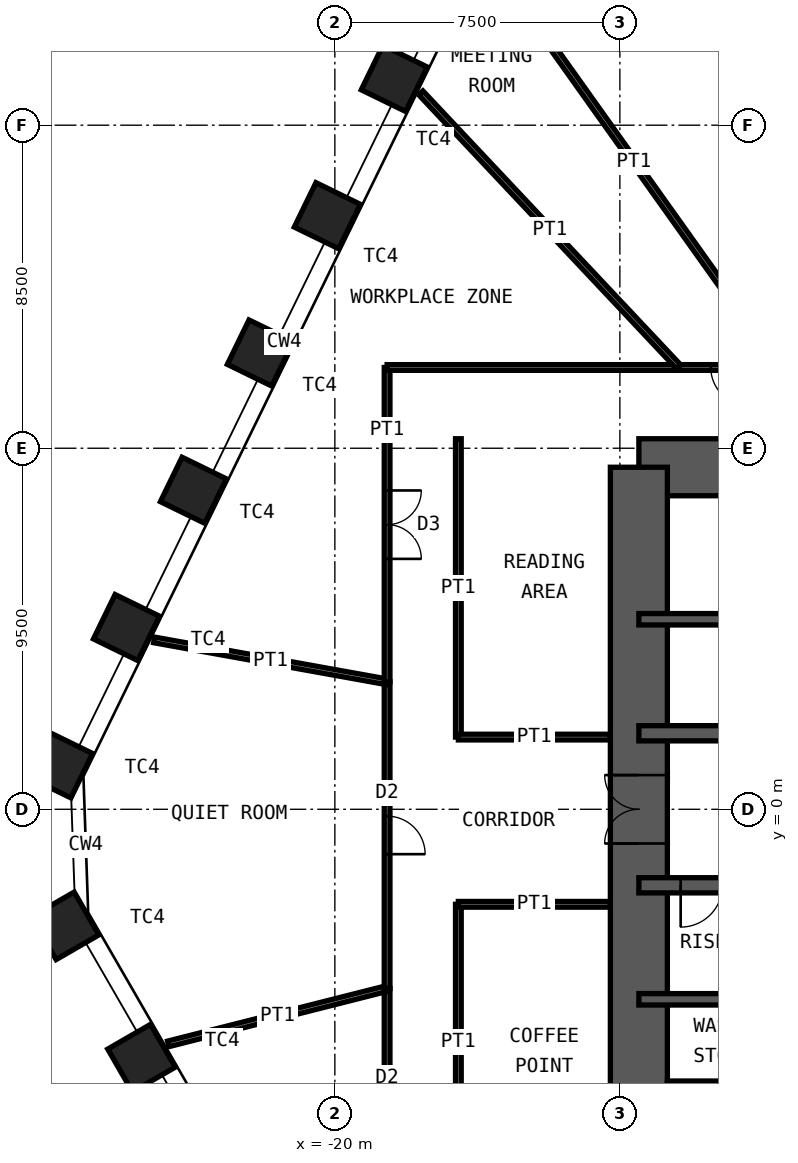
"""IFC4 building model, lengths in metres.
Left out: names, types, materials, properties, quantities, classifications, styles, units other than length and angle.
Written with IfcOpenShell. Run it as: python <this file> out.ifc"""

import sys

from ifc_helpers import new_model, si_unit, direction, frame, frame_2d, origin, origin_2d, place, context, subcontext, project, spatial, rectangle, hollow_rectangle, extrude, element, fill, save


model = new_model("IFC4")
c1 = context("Model", 3, precision=1e-05, world=origin(), true_north=direction((0.0, 1.0)))
c2 = subcontext(c1, "Body", "Model", "MODEL_VIEW")
j1 = project(units=[si_unit("LENGTHUNIT", "METRE"), si_unit("PLANEANGLEUNIT", "RADIAN")], contexts=[c1])
p1 = place(None, origin())
s1 = spatial("IfcSite", under=j1, at=p1, CompositionType="ELEMENT")
p2 = place(p1, origin())
s2 = spatial("IfcBuilding", under=s1, at=p2, CompositionType="ELEMENT")
p3 = place(p2, frame((0.0, 0.0, 149.2)))
s3 = spatial("IfcBuildingStorey", under=s2, at=p3, CompositionType="ELEMENT", Elevation=149.2)
for number, where, z_axis, x_axis in (
    (1, (-25.087, -6.547, 0.0), (0.0, 0.0, 1.0), (0.5, -0.866, 0.0)),
    (2, (-27.097, -3.067, 0.0), (0.0, 0.0, 1.0), (0.5, -0.866, 0.0)),
    (3, (-27.245, 1.169, 0.0), (0.0, 0.0, 1.0), (-0.438, -0.899, 0.0)),
    (4, (-25.483, 4.781, 0.0), (0.0, 0.0, 1.0), (-0.438, -0.899, 0.0)),
    (5, (-23.721, 8.394, 0.0), (0.0, 0.0, 1.0), (-0.438, -0.899, 0.0)),
    (6, (-21.959, 12.006, 0.0), (0.0, 0.0, 1.0), (-0.438, -0.899, 0.0)),
    (7, (-20.198, 15.618, 0.0), (0.0, 0.0, 1.0), (-0.438, -0.899, 0.0)),
    (8, (-18.436, 19.23, 0.0), (0.0, 0.0, 1.0), (-0.438, -0.899, 0.0)),
):
    element("IfcColumn", number, at=place(p3, frame(where, z_axis=z_axis, x_axis=x_axis)), inside=s3, PredefinedType="COLUMN", context=c2, shape_type="SweptSolid", body=[
        extrude(hollow_rectangle(XDim=1.3, YDim=1.3, WallThickness=0.1, at=origin_2d()), origin(), (0.0, 0.0, 1.0), 4.2),
    ])
p4 = place(p3, frame((-12.0, 9.0, 0.0), z_axis=(0.0, 0.0, 1.0), x_axis=(1.0, 0.0, 0.0)))
e9 = element("IfcWall", 9, at=p4, inside=s3, PredefinedType="SHEAR", context=c2, shape_type="SweptSolid", body=[
    extrude(rectangle(XDim=24.0, YDim=1.5, at=frame_2d((12.0, 0.0))), origin(), (0.0, 0.0, 1.0), 4.2),
])
p5 = place(p4, frame((10.4, 0.0, 0.0)))
e10 = element("IfcOpeningElement", 10, at=p5, cuts=e9, PredefinedType="OPENING", context=c2, shape_type="SweptSolid", body=[
    extrude(rectangle(XDim=1.0, YDim=2.1, at=frame_2d((0.5, 1.05))), frame((0.0, 0.76, 0.0), z_axis=(0.0, -1.0, 0.0), x_axis=(1.0, 0.0, 0.0)), (0.0, 0.0, 1.0), 1.52),
])
p6 = place(p4, frame((17.6, 0.0, 0.0)))
e11 = element("IfcOpeningElement", 11, at=p6, cuts=e9, PredefinedType="OPENING", context=c2, shape_type="SweptSolid", body=[
    extrude(rectangle(XDim=0.9, YDim=2.1, at=frame_2d((0.45, 1.05))), frame((0.0, 0.76, 0.0), z_axis=(0.0, -1.0, 0.0), x_axis=(1.0, 0.0, 0.0)), (0.0, 0.0, 1.0), 1.52),
])
p7 = place(p4, frame((21.9, 0.0, 0.0)))
e12 = element("IfcOpeningElement", 12, at=p7, cuts=e9, PredefinedType="OPENING", context=c2, shape_type="SweptSolid", body=[
    extrude(rectangle(XDim=0.9, YDim=2.1, at=frame_2d((0.45, 1.05))), frame((0.0, 0.76, 0.0), z_axis=(0.0, -1.0, 0.0), x_axis=(1.0, 0.0, 0.0)), (0.0, 0.0, 1.0), 1.52),
])
p8 = place(p3, frame((-12.0, -9.0, 0.0), z_axis=(0.0, 0.0, 1.0), x_axis=(0.0, 1.0, 0.0)))
e13 = element("IfcWall", 13, at=p8, inside=s3, PredefinedType="SHEAR", context=c2, shape_type="SweptSolid", body=[
    extrude(rectangle(XDim=18.0, YDim=1.5, at=frame_2d((9.0, 0.0))), origin(), (0.0, 0.0, 1.0), 4.2),
])
p9 = place(p8, frame((8.1, 0.0, 0.0)))
e14 = element("IfcOpeningElement", 14, at=p9, cuts=e13, PredefinedType="OPENING", context=c2, shape_type="SweptSolid", body=[
    extrude(rectangle(XDim=1.8, YDim=2.1, at=frame_2d((0.9, 1.05))), frame((0.0, 0.76, 0.0), z_axis=(0.0, -1.0, 0.0), x_axis=(1.0, 0.0, 0.0)), (0.0, 0.0, 1.0), 1.52),
])
p10 = place(p3, frame((-12.0, 5.0, 0.0), z_axis=(0.0, 0.0, 1.0), x_axis=(1.0, 0.0, 0.0)))
e15 = element("IfcWall", 15, at=p10, inside=s3, PredefinedType="SHEAR", context=c2, shape_type="SweptSolid", body=[
    extrude(rectangle(XDim=24.0, YDim=0.3, at=frame_2d((12.0, 0.0))), origin(), (0.0, 0.0, 1.0), 4.2),
])
p11 = place(p3, frame((-12.0, 2.0, 0.0), z_axis=(0.0, 0.0, 1.0), x_axis=(1.0, 0.0, 0.0)))
e16 = element("IfcWall", 16, at=p11, inside=s3, PredefinedType="SHEAR", context=c2, shape_type="SweptSolid", body=[
    extrude(rectangle(XDim=24.0, YDim=0.4, at=frame_2d((12.0, 0.0))), origin(), (0.0, 0.0, 1.0), 4.2),
])
p12 = place(p11, frame((2.4, 0.0, 0.0)))
e17 = element("IfcOpeningElement", 17, at=p12, cuts=e16, PredefinedType="OPENING", context=c2, shape_type="SweptSolid", body=[
    extrude(rectangle(XDim=1.1, YDim=2.1, at=frame_2d((0.55, 1.05))), frame((0.0, 0.21, 0.0), z_axis=(0.0, -1.0, 0.0), x_axis=(1.0, 0.0, 0.0)), (0.0, 0.0, 1.0), 0.42),
])
p13 = place(p11, frame((22.0, 0.0, 0.0)))
e18 = element("IfcOpeningElement", 18, at=p13, cuts=e16, PredefinedType="OPENING", context=c2, shape_type="SweptSolid", body=[
    extrude(rectangle(XDim=1.1, YDim=2.1, at=frame_2d((0.55, 1.05))), frame((0.0, 0.21, 0.0), z_axis=(0.0, -1.0, 0.0), x_axis=(1.0, 0.0, 0.0)), (0.0, 0.0, 1.0), 0.42),
])
p14 = place(p11, frame((10.15, 0.0, 0.0)))
e19 = element("IfcOpeningElement", 19, at=p14, cuts=e16, PredefinedType="OPENING", context=c2, shape_type="SweptSolid", body=[
    extrude(rectangle(XDim=1.0, YDim=2.1, at=frame_2d((0.5, 1.05))), frame((0.0, 0.21, 0.0), z_axis=(0.0, -1.0, 0.0), x_axis=(1.0, 0.0, 0.0)), (0.0, 0.0, 1.0), 0.42),
])
p15 = place(p11, frame((6.9, 0.0, 0.0)))
e20 = element("IfcOpeningElement", 20, at=p15, cuts=e16, PredefinedType="OPENING", context=c2, shape_type="SweptSolid", body=[
    extrude(rectangle(XDim=1.0, YDim=2.1, at=frame_2d((0.5, 1.05))), frame((0.0, 0.21, 0.0), z_axis=(0.0, -1.0, 0.0), x_axis=(1.0, 0.0, 0.0)), (0.0, 0.0, 1.0), 0.42),
])
p16 = place(p11, frame((13.35, 0.0, 0.0)))
e21 = element("IfcOpeningElement", 21, at=p16, cuts=e16, PredefinedType="OPENING", context=c2, shape_type="SweptSolid", body=[
    extrude(rectangle(XDim=1.1, YDim=2.4, at=frame_2d((0.55, 1.2))), frame((0.0, 0.21, 0.0), z_axis=(0.0, -1.0, 0.0), x_axis=(1.0, 0.0, 0.0)), (0.0, 0.0, 1.0), 0.42),
])
p17 = place(p11, frame((16.15, 0.0, 0.0)))
e22 = element("IfcOpeningElement", 22, at=p17, cuts=e16, PredefinedType="OPENING", context=c2, shape_type="SweptSolid", body=[
    extrude(rectangle(XDim=1.1, YDim=2.4, at=frame_2d((0.55, 1.2))), frame((0.0, 0.21, 0.0), z_axis=(0.0, -1.0, 0.0), x_axis=(1.0, 0.0, 0.0)), (0.0, 0.0, 1.0), 0.42),
])
p18 = place(p11, frame((18.95, 0.0, 0.0)))
e23 = element("IfcOpeningElement", 23, at=p18, cuts=e16, PredefinedType="OPENING", context=c2, shape_type="SweptSolid", body=[
    extrude(rectangle(XDim=1.1, YDim=2.4, at=frame_2d((0.55, 1.2))), frame((0.0, 0.21, 0.0), z_axis=(0.0, -1.0, 0.0), x_axis=(1.0, 0.0, 0.0)), (0.0, 0.0, 1.0), 0.42),
])
p19 = place(p3, frame((-12.0, -2.0, 0.0), z_axis=(0.0, 0.0, 1.0), x_axis=(1.0, 0.0, 0.0)))
e24 = element("IfcWall", 24, at=p19, inside=s3, PredefinedType="SHEAR", context=c2, shape_type="SweptSolid", body=[
    extrude(rectangle(XDim=24.0, YDim=0.4, at=frame_2d((12.0, 0.0))), origin(), (0.0, 0.0, 1.0), 4.2),
])
p20 = place(p19, frame((1.1, 0.0, 0.0)))
e25 = element("IfcOpeningElement", 25, at=p20, cuts=e24, PredefinedType="OPENING", context=c2, shape_type="SweptSolid", body=[
    extrude(rectangle(XDim=1.1, YDim=2.1, at=frame_2d((0.55, 1.05))), frame((0.0, 0.21, 0.0), z_axis=(0.0, -1.0, 0.0), x_axis=(1.0, 0.0, 0.0)), (0.0, 0.0, 1.0), 0.42),
])
p21 = place(p19, frame((13.55, 0.0, 0.0)))
e26 = element("IfcOpeningElement", 26, at=p21, cuts=e24, PredefinedType="OPENING", context=c2, shape_type="SweptSolid", body=[
    extrude(rectangle(XDim=1.1, YDim=2.1, at=frame_2d((0.55, 1.05))), frame((0.0, 0.21, 0.0), z_axis=(0.0, -1.0, 0.0), x_axis=(1.0, 0.0, 0.0)), (0.0, 0.0, 1.0), 0.42),
])
p22 = place(p19, frame((20.7, 0.0, 0.0)))
e27 = element("IfcOpeningElement", 27, at=p22, cuts=e24, PredefinedType="OPENING", context=c2, shape_type="SweptSolid", body=[
    extrude(rectangle(XDim=1.1, YDim=2.1, at=frame_2d((0.55, 1.05))), frame((0.0, 0.21, 0.0), z_axis=(0.0, -1.0, 0.0), x_axis=(1.0, 0.0, 0.0)), (0.0, 0.0, 1.0), 0.42),
])
p23 = place(p19, frame((4.0, 0.0, 0.0)))
e28 = element("IfcOpeningElement", 28, at=p23, cuts=e24, PredefinedType="OPENING", context=c2, shape_type="SweptSolid", body=[
    extrude(rectangle(XDim=1.0, YDim=2.1, at=frame_2d((0.5, 1.05))), frame((0.0, 0.21, 0.0), z_axis=(0.0, -1.0, 0.0), x_axis=(1.0, 0.0, 0.0)), (0.0, 0.0, 1.0), 0.42),
])
p24 = place(p3, frame((-12.0, -5.0, 0.0), z_axis=(0.0, 0.0, 1.0), x_axis=(1.0, 0.0, 0.0)))
e29 = element("IfcWall", 29, at=p24, inside=s3, PredefinedType="SHEAR", context=c2, shape_type="SweptSolid", body=[
    extrude(rectangle(XDim=24.0, YDim=0.3, at=frame_2d((12.0, 0.0))), origin(), (0.0, 0.0, 1.0), 4.2),
])
p25 = place(p3, frame((-11.25, -7.2, 0.0), z_axis=(0.0, 0.0, 1.0), x_axis=(1.0, 0.0, 0.0)))
e30 = element("IfcWall", 30, at=p25, inside=s3, PredefinedType="PARTITIONING", context=c2, shape_type="SweptSolid", body=[
    extrude(rectangle(XDim=2.9, YDim=0.1, at=frame_2d((1.45, 0.0))), origin(), (0.0, 0.0, 1.0), 3.98),
])
p26 = place(p25, frame((0.1, 0.0, 0.0)))
e31 = element("IfcOpeningElement", 31, at=p26, cuts=e30, PredefinedType="OPENING", context=c2, shape_type="SweptSolid", body=[
    extrude(rectangle(XDim=1.0, YDim=2.4, at=frame_2d((0.5, 1.2))), frame((0.0, 0.06, 0.0), z_axis=(0.0, -1.0, 0.0), x_axis=(1.0, 0.0, 0.0)), (0.0, 0.0, 1.0), 0.12),
])
p27 = place(p3, frame((-18.625, -11.625, 0.0), z_axis=(0.0, 0.0, 1.0), x_axis=(0.0, 1.0, 0.0)))
e32 = element("IfcWall", 32, at=p27, inside=s3, PredefinedType="PARTITIONING", context=c2, shape_type="SweptSolid", body=[
    extrude(rectangle(XDim=6.91, YDim=0.15, at=frame_2d((3.455, 0.0))), origin(), (0.0, 0.0, 1.0), 4.03),
])
p28 = place(p27, frame((2.955, 0.0, 0.0)))
e33 = element("IfcOpeningElement", 33, at=p28, cuts=e32, PredefinedType="OPENING", context=c2, shape_type="SweptSolid", body=[
    extrude(rectangle(XDim=1.0, YDim=2.4, at=frame_2d((0.5, 1.2))), frame((0.0, 0.085, 0.0), z_axis=(0.0, -1.0, 0.0), x_axis=(1.0, 0.0, 0.0)), (0.0, 0.0, 1.0), 0.17),
])
p29 = place(p3, frame((-24.384, -6.173, 0.0), z_axis=(0.0, 0.0, 1.0), x_axis=(0.969427635767, 0.245377380804, 0.0)))
e34 = element("IfcWall", 34, at=p29, inside=s3, PredefinedType="PARTITIONING", context=c2, shape_type="SweptSolid", body=[
    extrude(rectangle(XDim=5.941, YDim=0.15, at=frame_2d((2.97, 0.0))), origin(), (0.0, 0.0, 1.0), 3.33),
])
p30 = place(p3, frame((-18.625, -4.715, 0.0), z_axis=(0.0, 0.0, 1.0), x_axis=(0.0, 1.0, 0.0)))
e35 = element("IfcWall", 35, at=p30, inside=s3, PredefinedType="PARTITIONING", context=c2, shape_type="SweptSolid", body=[
    extrude(rectangle(XDim=8.068, YDim=0.15, at=frame_2d((4.034, 0.0))), origin(), (0.0, 0.0, 1.0), 4.03),
])
p31 = place(p30, frame((3.534, 0.0, 0.0)))
e36 = element("IfcOpeningElement", 36, at=p31, cuts=e35, PredefinedType="OPENING", context=c2, shape_type="SweptSolid", body=[
    extrude(rectangle(XDim=1.0, YDim=2.4, at=frame_2d((0.5, 1.2))), frame((0.0, 0.085, 0.0), z_axis=(0.0, -1.0, 0.0), x_axis=(1.0, 0.0, 0.0)), (0.0, 0.0, 1.0), 0.17),
])
p32 = place(p3, frame((-24.755, 4.457, 0.0), z_axis=(0.0, 0.0, 1.0), x_axis=(0.984175122587, -0.177198555524, 0.0)))
e37 = element("IfcWall", 37, at=p32, inside=s3, PredefinedType="PARTITIONING", context=c2, shape_type="SweptSolid", body=[
    extrude(rectangle(XDim=6.229, YDim=0.15, at=frame_2d((3.115, 0.0))), origin(), (0.0, 0.0, 1.0), 3.33),
])
p33 = place(p3, frame((-18.625, 3.353, 0.0), z_axis=(0.0, 0.0, 1.0), x_axis=(0.0, 1.0, 0.0)))
e38 = element("IfcWall", 38, at=p33, inside=s3, PredefinedType="PARTITIONING", context=c2, shape_type="SweptSolid", body=[
    extrude(rectangle(XDim=8.272, YDim=0.15, at=frame_2d((4.136, 0.0))), origin(), (0.0, 0.0, 1.0), 4.03),
])
p34 = place(p33, frame((3.236, 0.0, 0.0)))
e39 = element("IfcOpeningElement", 39, at=p34, cuts=e38, PredefinedType="OPENING", context=c2, shape_type="SweptSolid", body=[
    extrude(rectangle(XDim=1.8, YDim=2.4, at=frame_2d((0.9, 1.2))), frame((0.0, 0.085, 0.0), z_axis=(0.0, -1.0, 0.0), x_axis=(1.0, 0.0, 0.0)), (0.0, 0.0, 1.0), 0.17),
])
p35 = place(p3, frame((-18.625, 11.625, 0.0), z_axis=(0.0, 0.0, 1.0), x_axis=(1.0, 0.0, 0.0)))
e40 = element("IfcWall", 40, at=p35, inside=s3, PredefinedType="PARTITIONING", context=c2, shape_type="SweptSolid", body=[
    extrude(rectangle(XDim=7.686, YDim=0.15, at=frame_2d((3.843, 0.0))), origin(), (0.0, 0.0, 1.0), 4.03),
])
p36 = place(p3, frame((-17.738, 18.851, 0.0), z_axis=(0.0, 0.0, 1.0), x_axis=(0.685286406267, -0.728273672039, 0.0)))
e41 = element("IfcWall", 41, at=p36, inside=s3, PredefinedType="PARTITIONING", context=c2, shape_type="SweptSolid", body=[
    extrude(rectangle(XDim=9.922, YDim=0.15, at=frame_2d((4.961, 0.0))), origin(), (0.0, 0.0, 1.0), 3.33),
])
p37 = place(p3, frame((-10.939, 11.625, 0.0), z_axis=(0.0, 0.0, 1.0), x_axis=(1.0, 0.0, 0.0)))
e42 = element("IfcWall", 42, at=p37, inside=s3, PredefinedType="PARTITIONING", context=c2, shape_type="SweptSolid", body=[
    extrude(rectangle(XDim=2.662, YDim=0.15, at=frame_2d((1.331, 0.0))), origin(), (0.0, 0.0, 1.0), 4.03),
])
p38 = place(p37, frame((0.831, 0.0, 0.0)))
e43 = element("IfcOpeningElement", 43, at=p38, cuts=e42, PredefinedType="OPENING", context=c2, shape_type="SweptSolid", body=[
    extrude(rectangle(XDim=1.0, YDim=2.4, at=frame_2d((0.5, 1.2))), frame((0.0, 0.085, 0.0), z_axis=(0.0, -1.0, 0.0), x_axis=(1.0, 0.0, 0.0)), (0.0, 0.0, 1.0), 0.17),
])
p39 = place(p3, frame((-15.987, 22.455, 0.0), z_axis=(0.0, 0.0, 1.0), x_axis=(0.579969304452, -0.814638328274, 0.0)))
e44 = element("IfcWall", 44, at=p39, inside=s3, PredefinedType="PARTITIONING", context=c2, shape_type="SweptSolid", body=[
    extrude(rectangle(XDim=13.294, YDim=0.15, at=frame_2d((6.647, 0.0))), origin(), (0.0, 0.0, 1.0), 2.93),
])
p40 = place(p3, frame((-16.75, 1.9, 0.0), z_axis=(0.0, 0.0, 1.0), x_axis=(0.0, 1.0, 0.0)))
e45 = element("IfcWall", 45, at=p40, inside=s3, PredefinedType="PARTITIONING", context=c2, shape_type="SweptSolid", body=[
    extrude(rectangle(XDim=7.85, YDim=0.15, at=frame_2d((3.925, 0.0))), origin(), (0.0, 0.0, 1.0), 4.03),
])
p41 = place(p3, frame((-12.75, 1.9, 0.0), z_axis=(0.0, 0.0, 1.0), x_axis=(-1.0, 0.0, 0.0)))
e46 = element("IfcWall", 46, at=p41, inside=s3, PredefinedType="PARTITIONING", context=c2, shape_type="SweptSolid", body=[
    extrude(rectangle(XDim=4.0, YDim=0.15, at=frame_2d((2.0, 0.0))), origin(), (0.0, 0.0, 1.0), 3.33),
])
p42 = place(p3, frame((-16.75, -9.75, 0.0), z_axis=(0.0, 0.0, 1.0), x_axis=(0.0, 1.0, 0.0)))
e47 = element("IfcWall", 47, at=p42, inside=s3, PredefinedType="PARTITIONING", context=c2, shape_type="SweptSolid", body=[
    extrude(rectangle(XDim=7.25, YDim=0.15, at=frame_2d((3.625, 0.0))), origin(), (0.0, 0.0, 1.0), 4.03),
])
p43 = place(p3, frame((-12.75, -2.5, 0.0), z_axis=(0.0, 0.0, 1.0), x_axis=(-1.0, 0.0, 0.0)))
e48 = element("IfcWall", 48, at=p43, inside=s3, PredefinedType="PARTITIONING", context=c2, shape_type="SweptSolid", body=[
    extrude(rectangle(XDim=4.0, YDim=0.15, at=frame_2d((2.0, 0.0))), origin(), (0.0, 0.0, 1.0), 3.33),
])
p44 = place(p20, origin())
e49 = element("IfcDoor", 49, at=p44, inside=s3, OperationType="SINGLE_SWING_LEFT", PredefinedType="DOOR", context=c2, shape_type="SweptSolid", body=[
    extrude(rectangle(XDim=1.1, YDim=2.1, at=frame_2d((0.55, 1.05))), frame((0.0, 0.025, 0.0), z_axis=(0.0, -1.0, 0.0), x_axis=(1.0, 0.0, 0.0)), (0.0, 0.0, 1.0), 0.05),
])
fill(e25, e49)
p45 = place(p9, origin())
e50 = element("IfcDoor", 50, at=p45, inside=s3, OperationType="DOUBLE_DOOR_DOUBLE_SWING", PredefinedType="DOOR", context=c2, shape_type="SweptSolid", body=[
    extrude(rectangle(XDim=1.8, YDim=2.1, at=frame_2d((0.9, 1.05))), frame((0.0, 0.025, 0.0), z_axis=(0.0, -1.0, 0.0), x_axis=(1.0, 0.0, 0.0)), (0.0, 0.0, 1.0), 0.05),
])
fill(e14, e50)
p46 = place(p26, origin())
e51 = element("IfcDoor", 51, at=p46, inside=s3, OperationType="SINGLE_SWING_LEFT", PredefinedType="DOOR", context=c2, shape_type="SweptSolid", body=[
    extrude(rectangle(XDim=1.0, YDim=2.4, at=frame_2d((0.5, 1.2))), frame((0.0, 0.025, 0.0), z_axis=(0.0, -1.0, 0.0), x_axis=(1.0, 0.0, 0.0)), (0.0, 0.0, 1.0), 0.05),
])
fill(e31, e51)
p47 = place(p31, origin())
e52 = element("IfcDoor", 52, at=p47, inside=s3, OperationType="SINGLE_SWING_LEFT", PredefinedType="DOOR", context=c2, shape_type="SweptSolid", body=[
    extrude(rectangle(XDim=1.0, YDim=2.4, at=frame_2d((0.5, 1.2))), frame((0.0, 0.025, 0.0), z_axis=(0.0, -1.0, 0.0), x_axis=(1.0, 0.0, 0.0)), (0.0, 0.0, 1.0), 0.05),
])
fill(e36, e52)
p48 = place(p34, origin())
e53 = element("IfcDoor", 53, at=p48, inside=s3, OperationType="DOUBLE_DOOR_DOUBLE_SWING", PredefinedType="DOOR", context=c2, shape_type="SweptSolid", body=[
    extrude(rectangle(XDim=1.8, YDim=2.4, at=frame_2d((0.9, 1.2))), frame((0.0, 0.025, 0.0), z_axis=(0.0, -1.0, 0.0), x_axis=(1.0, 0.0, 0.0)), (0.0, 0.0, 1.0), 0.05),
])
fill(e39, e53)
p49 = place(p38, origin())
e54 = element("IfcDoor", 54, at=p49, inside=s3, OperationType="SINGLE_SWING_RIGHT", PredefinedType="DOOR", context=c2, shape_type="SweptSolid", body=[
    extrude(rectangle(XDim=1.0, YDim=2.4, at=frame_2d((0.5, 1.2))), frame((0.0, 0.025, 0.0), z_axis=(0.0, -1.0, 0.0), x_axis=(1.0, 0.0, 0.0)), (0.0, 0.0, 1.0), 0.05),
])
fill(e43, e54)
save(model, sys.argv[1])
